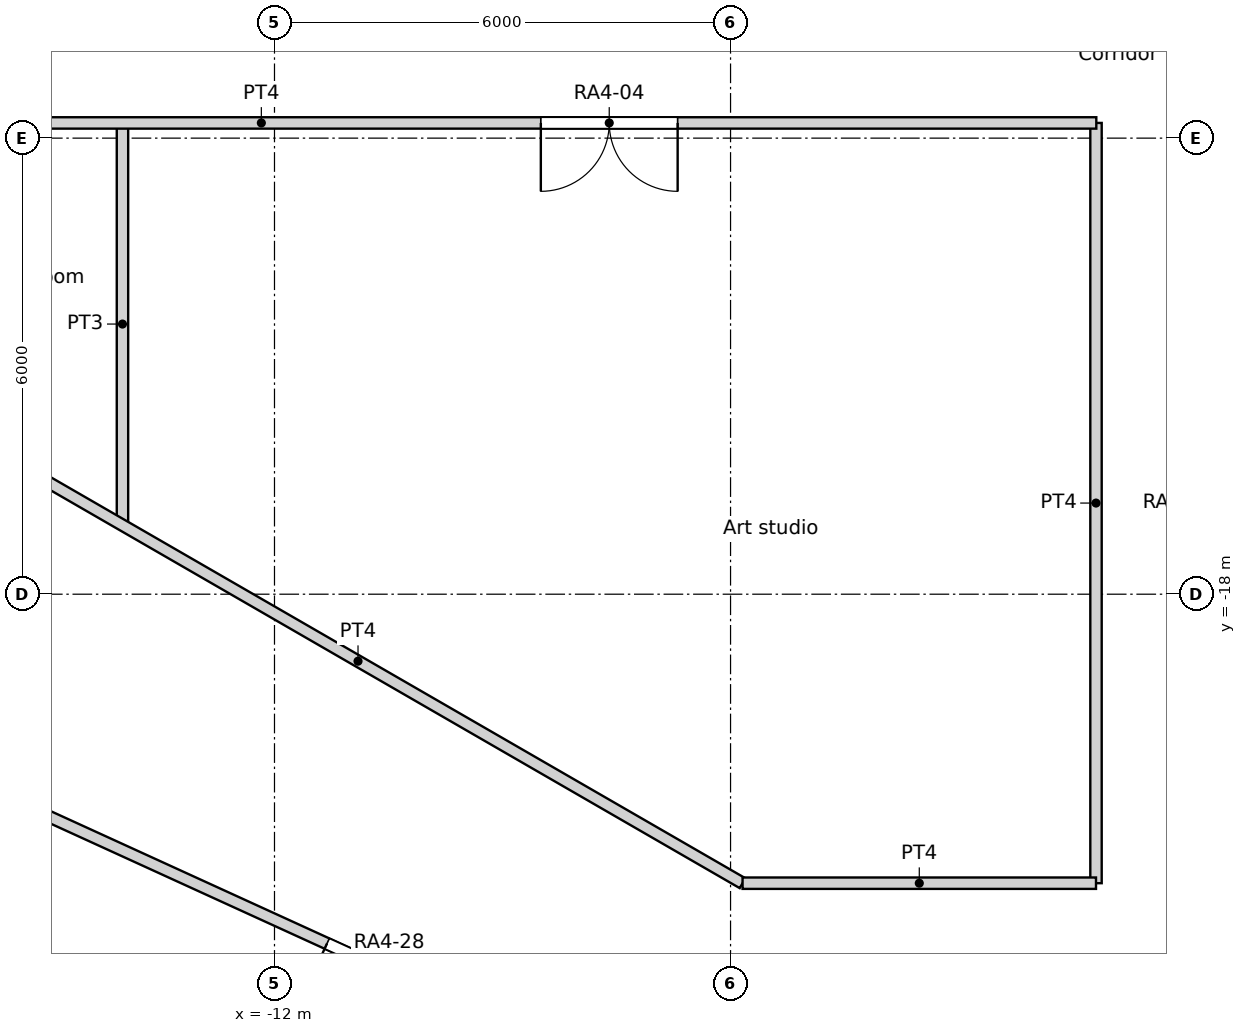
"""IFC4 building model, lengths in metres.
Left out: names, types, materials, properties, quantities, classifications, styles, units other than length and angle.
Written with IfcOpenShell. Run it as: python <this file> out.ifc"""

import sys

from ifc_helpers import new_model, si_unit, direction, frame, frame_2d, origin, origin_2d, place, context, subcontext, project, spatial, rectangle, circle, extrude, element, fill, save


model = new_model("IFC4")
c1 = context("Model", 3, precision=1e-05, world=origin(), true_north=direction((0.0, 1.0)))
c2 = subcontext(c1, "Body", "Model", "MODEL_VIEW")
j1 = project(units=[si_unit("LENGTHUNIT", "METRE"), si_unit("PLANEANGLEUNIT", "RADIAN")], contexts=[c1])
p1 = place(None, origin())
s1 = spatial("IfcSite", under=j1, at=p1, CompositionType="ELEMENT")
p2 = place(p1, origin())
s2 = spatial("IfcBuilding", under=s1, at=p2, CompositionType="ELEMENT")
p3 = place(p2, frame((0.0, 0.0, 60.6)))
s3 = spatial("IfcBuildingStorey", under=s2, at=p3, CompositionType="ELEMENT", Elevation=60.6)
p4 = place(p3, frame((-12.274, -21.259, 0.0), z_axis=(0.0, 0.0, 1.0), x_axis=(1.0, 0.0, 0.0)))
e1 = element("IfcColumn", 1, at=p4, inside=s3, PredefinedType="COLUMN", context=c2, shape_type="SweptSolid", body=[
    extrude(circle(Radius=0.75, at=origin_2d()), origin(), (0.0, 0.0, 1.0), 3.6),
])
for number, where, z_axis, x_axis in (
    (2, (-13.798, -12.802, 0.0), (0.0, 0.0, 1.0), (1.0, 0.0, 0.0)),
    (3, (-9.411, -16.301, 0.0), (0.0, 0.0, 1.0), (1.0, 0.0, 0.0)),
    (4, (-4.188, -18.35, 0.0), (0.0, 0.0, 1.0), (1.0, 0.0, 0.0)),
):
    element("IfcColumn", number, at=place(p3, frame(where, z_axis=z_axis, x_axis=x_axis)), inside=s3, PredefinedType="COLUMN", context=c2, shape_type="SweptSolid", body=[
        extrude(circle(Radius=0.8, at=origin_2d()), origin(), (0.0, 0.0, 1.0), 3.6),
    ])
p5 = place(p3, frame((-15.8, -11.8, 0.0), z_axis=(0.0, 0.0, 1.0), x_axis=(1.0, 0.0, 0.0)))
e5 = element("IfcWall", 5, at=p5, inside=s3, PredefinedType="PARTITIONING", context=c2, shape_type="SweptSolid", body=[
    extrude(rectangle(XDim=14.612, YDim=0.15, at=frame_2d((7.306, 0.0))), origin(), (0.0, 0.0, 1.0), 3.15),
])
p6 = place(p5, frame((7.304, 0.0, 0.0)))
e6 = element("IfcOpeningElement", 6, at=p6, cuts=e5, PredefinedType="OPENING", context=c2, shape_type="SweptSolid", body=[
    extrude(rectangle(XDim=1.8, YDim=2.1, at=frame_2d((0.9, 1.05))), frame((0.0, 0.075, 0.0), z_axis=(0.0, -1.0, 0.0), x_axis=(1.0, 0.0, 0.0)), (0.0, 0.0, 1.0), 0.15),
])
p7 = place(p3, frame((-15.96, -15.96, 0.0), z_axis=(0.0, 0.0, 1.0), x_axis=(0.866022730501, -0.500004630234, 0.0)))
e7 = element("IfcWall", 7, at=p7, inside=s3, PredefinedType="PARTITIONING", context=c2, shape_type="SweptSolid", body=[
    extrude(rectangle(XDim=11.684, YDim=0.15, at=frame_2d((5.842, 0.0))), origin(), (0.0, 0.0, 1.0), 3.15),
])
p8 = place(p3, frame((-5.842, -21.802, 0.0), z_axis=(0.0, 0.0, 1.0), x_axis=(1.0, 0.0, 0.0)))
e8 = element("IfcWall", 8, at=p8, inside=s3, PredefinedType="PARTITIONING", context=c2, shape_type="SweptSolid", body=[
    extrude(rectangle(XDim=4.65, YDim=0.15, at=frame_2d((2.325, 0.0))), origin(), (0.0, 0.0, 1.0), 3.15),
])
p9 = place(p3, frame((-1.192, -21.802, 0.0), z_axis=(0.0, 0.0, 1.0), x_axis=(0.0, 1.0, 0.0)))
e9 = element("IfcWall", 9, at=p9, inside=s3, PredefinedType="PARTITIONING", context=c2, shape_type="SweptSolid", body=[
    extrude(rectangle(XDim=10.002, YDim=0.15, at=frame_2d((5.001, 0.0))), origin(), (0.0, 0.0, 1.0), 3.15),
])
p10 = place(p3, frame((-17.235, -19.89, 0.0), z_axis=(0.0, 0.0, 1.0), x_axis=(0.90960889055, -0.415465601743, 0.0)))
e10 = element("IfcWall", 10, at=p10, inside=s3, PredefinedType="PARTITIONING", context=c2, shape_type="SweptSolid", body=[
    extrude(rectangle(XDim=14.829, YDim=0.15, at=frame_2d((7.415, 0.0))), origin(), (0.0, 0.0, 1.0), 3.15),
])
p11 = place(p10, frame((6.514, 0.0, 0.0)))
e11 = element("IfcOpeningElement", 11, at=p11, cuts=e10, PredefinedType="OPENING", context=c2, shape_type="SweptSolid", body=[
    extrude(rectangle(XDim=1.8, YDim=2.1, at=frame_2d((0.9, 1.05))), frame((0.0, 0.075, 0.0), z_axis=(0.0, -1.0, 0.0), x_axis=(1.0, 0.0, 0.0)), (0.0, 0.0, 1.0), 0.15),
])
p12 = place(p3, frame((-14.0, -17.092, 0.0), z_axis=(0.0, 0.0, 1.0), x_axis=(0.0, 1.0, 0.0)))
e12 = element("IfcWall", 12, at=p12, inside=s3, PredefinedType="PARTITIONING", context=c2, shape_type="SweptSolid", body=[
    extrude(rectangle(XDim=5.292, YDim=0.15, at=frame_2d((2.646, 0.0))), origin(), (0.0, 0.0, 1.0), 3.15),
])
p13 = place(p6, origin())
e13 = element("IfcDoor", 13, at=p13, inside=s3, OperationType="DOUBLE_DOOR_SINGLE_SWING", PredefinedType="DOOR", context=c2, shape_type="SweptSolid", body=[
    extrude(rectangle(XDim=1.8, YDim=2.1, at=frame_2d((0.9, 1.05))), frame((0.0, 0.025, 0.0), z_axis=(0.0, -1.0, 0.0), x_axis=(1.0, 0.0, 0.0)), (0.0, 0.0, 1.0), 0.05),
])
fill(e6, e13)
p14 = place(p11, origin())
e14 = element("IfcDoor", 14, at=p14, inside=s3, OperationType="DOUBLE_DOOR_SINGLE_SWING", PredefinedType="DOOR", context=c2, shape_type="SweptSolid", body=[
    extrude(rectangle(XDim=1.8, YDim=2.1, at=frame_2d((0.9, 1.05))), frame((0.0, 0.025, 0.0), z_axis=(0.0, -1.0, 0.0), x_axis=(1.0, 0.0, 0.0)), (0.0, 0.0, 1.0), 0.05),
])
fill(e11, e14)
save(model, sys.argv[1])
